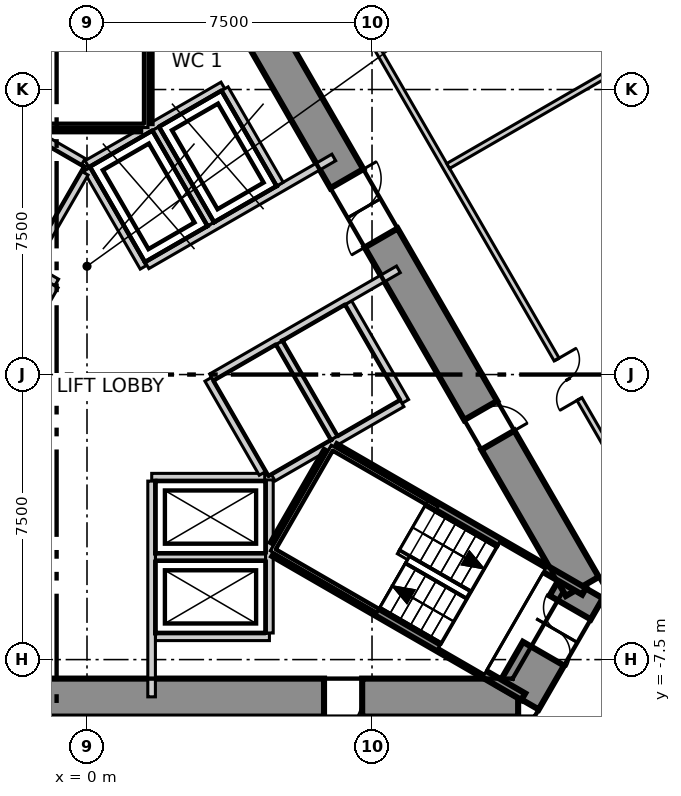
"""IFC4 building model, lengths in metres.
Left out: names, types, materials, properties, quantities, classifications, styles, units other than length and angle.
Written with IfcOpenShell. Run it as: python <this file> out.ifc"""

import sys

from ifc_helpers import new_model, si_unit, direction, frame, frame_2d, origin, place, context, subcontext, project, spatial, polyline, rectangle, outline, extrude, element, fill, save


model = new_model("IFC4")
c1 = context("Model", 3, precision=1e-05, world=origin(), true_north=direction((0.0, 1.0)))
c2 = subcontext(c1, "Body", "Model", "MODEL_VIEW")
j1 = project(units=[si_unit("LENGTHUNIT", "METRE"), si_unit("PLANEANGLEUNIT", "RADIAN")], contexts=[c1])
p1 = place(None, origin())
s1 = spatial("IfcSite", under=j1, at=p1, CompositionType="ELEMENT")
p2 = place(p1, origin())
s2 = spatial("IfcBuilding", under=s1, at=p2, CompositionType="ELEMENT")
p3 = place(p2, frame((0.0, 0.0, 180.8)))
s3 = spatial("IfcBuildingStorey", under=s2, at=p3, CompositionType="ELEMENT", Elevation=180.8)
p4 = place(p3, frame((-11.345, -8.5, -0.6), z_axis=(0.0, 0.0, 1.0), x_axis=(1.0, 0.0, 0.0)))
e1 = element("IfcWall", 1, at=p4, inside=s3, PredefinedType="SHEAR", context=c2, shape_type="SweptSolid", body=[
    extrude(outline(polyline([(-0.433, -0.5), (1.53, -0.5), (3.493, -0.5), (5.456, -0.5), (7.419, -0.5), (9.382, -0.5), (11.345, -0.5), (13.308, -0.5), (15.271, -0.5), (17.234, -0.5), (19.197, -0.5), (21.16, -0.5), (23.123, -0.5), (22.257, 0.5), (20.273, 0.5), (18.289, 0.5), (16.305, 0.5), (14.321, 0.5), (12.337, 0.5), (10.353, 0.5), (8.369, 0.5), (6.385, 0.5), (4.401, 0.5), (2.417, 0.5), (0.433, 0.5), (-0.433, -0.5)])), origin(), (0.0, 0.0, 1.0), 4.5),
])
p5 = place(p4, frame((4.444, 0.0, 0.6)))
e2 = element("IfcOpeningElement", 2, at=p5, cuts=e1, PredefinedType="OPENING", context=c2, shape_type="SweptSolid", body=[
    extrude(rectangle(XDim=0.9, YDim=2.1, at=frame_2d((0.45, 1.05))), frame((0.0, 0.51, 0.0), z_axis=(0.0, -1.0, 0.0), x_axis=(1.0, 0.0, 0.0)), (0.0, 0.0, 1.0), 1.02),
])
p6 = place(p4, frame((17.584, 0.0, 0.6)))
e3 = element("IfcOpeningElement", 3, at=p6, cuts=e1, PredefinedType="OPENING", context=c2, shape_type="SweptSolid", body=[
    extrude(rectangle(XDim=1.0, YDim=2.1, at=frame_2d((0.5, 1.05))), frame((0.0, 0.51, 0.0), z_axis=(0.0, -1.0, 0.0), x_axis=(1.0, 0.0, 0.0)), (0.0, 0.0, 1.0), 1.02),
])
p7 = place(p3, frame((11.345, -8.5, -0.6), z_axis=(0.0, 0.0, 1.0), x_axis=(0.500041548022, 0.866001414694, 0.0)))
e4 = element("IfcWall", 4, at=p7, inside=s3, PredefinedType="SHEAR", context=c2, shape_type="SweptSolid", body=[
    extrude(outline(polyline([(-0.216, -0.625), (1.689, -0.625), (3.594, -0.625), (3.161, 0.625), (1.688, 0.625), (0.216, 0.625), (-0.216, -0.625)])), origin(), (0.0, 0.0, 1.0), 4.5),
])
p8 = place(p7, frame((1.336, 0.0, 0.6)))
e5 = element("IfcOpeningElement", 5, at=p8, cuts=e4, PredefinedType="OPENING", context=c2, shape_type="SweptSolid", body=[
    extrude(rectangle(XDim=1.4, YDim=2.1, at=frame_2d((0.7, 1.05))), frame((0.0, 0.635, 0.0), z_axis=(0.0, -1.0, 0.0), x_axis=(1.0, 0.0, 0.0)), (0.0, 0.0, 1.0), 1.27),
])
p9 = place(p3, frame((13.034, -5.575, -0.6), z_axis=(0.0, 0.0, 1.0), x_axis=(-0.500003116884, 0.866023604243, 0.0)))
e6 = element("IfcWall", 6, at=p9, inside=s3, PredefinedType="SHEAR", context=c2, shape_type="SweptSolid", body=[
    extrude(outline(polyline([(-0.433, -0.5), (1.53, -0.5), (3.493, -0.5), (5.456, -0.5), (7.419, -0.5), (9.382, -0.5), (11.345, -0.5), (13.308, -0.5), (15.271, -0.5), (17.234, -0.5), (19.197, -0.5), (21.16, -0.5), (23.123, -0.5), (22.257, 0.5), (20.273, 0.5), (18.289, 0.5), (16.305, 0.5), (14.321, 0.5), (12.337, 0.5), (10.353, 0.5), (8.369, 0.5), (6.385, 0.5), (4.401, 0.5), (2.417, 0.5), (0.433, 0.5), (-0.433, -0.5)])), origin(), (0.0, 0.0, 1.0), 4.5),
])
p10 = place(p9, frame((10.589, 0.0, 0.6)))
e7 = element("IfcOpeningElement", 7, at=p10, cuts=e6, PredefinedType="OPENING", context=c2, shape_type="SweptSolid", body=[
    extrude(rectangle(XDim=1.8, YDim=2.1, at=frame_2d((0.9, 1.05))), frame((0.0, 0.51, 0.0), z_axis=(0.0, -1.0, 0.0), x_axis=(1.0, 0.0, 0.0)), (0.0, 0.0, 1.0), 1.02),
])
p11 = place(p9, frame((17.634, 0.0, 0.6)))
e8 = element("IfcOpeningElement", 8, at=p11, cuts=e6, PredefinedType="OPENING", context=c2, shape_type="SweptSolid", body=[
    extrude(rectangle(XDim=0.9, YDim=2.1, at=frame_2d((0.45, 1.05))), frame((0.0, 0.51, 0.0), z_axis=(0.0, -1.0, 0.0), x_axis=(1.0, 0.0, 0.0)), (0.0, 0.0, 1.0), 1.02),
])
p12 = place(p9, frame((4.445, 0.0, 0.6)))
e9 = element("IfcOpeningElement", 9, at=p12, cuts=e6, PredefinedType="OPENING", context=c2, shape_type="SweptSolid", body=[
    extrude(rectangle(XDim=0.9, YDim=2.1, at=frame_2d((0.45, 1.05))), frame((0.0, 0.51, 0.0), z_axis=(0.0, -1.0, 0.0), x_axis=(1.0, 0.0, 0.0)), (0.0, 0.0, 1.0), 1.02),
])
p13 = place(p3, frame((29.569, -13.712, 0.0), z_axis=(0.0, 0.0, 1.0), x_axis=(-0.500011769953, 0.866018608292, 0.0)))
e10 = element("IfcWall", 10, at=p13, inside=s3, PredefinedType="ELEMENTEDWALL", context=c2, shape_type="SweptSolid", body=[
    extrude(rectangle(XDim=53.299, YDim=0.2, at=frame_2d((26.649, 0.0))), origin(), (0.0, 0.0, 1.0), 3.9),
])
p14 = place(p13, frame((2.022, 0.0, 0.6)))
e11 = element("IfcOpeningElement", 11, at=p14, cuts=e10, PredefinedType="OPENING", context=c2, shape_type="SweptSolid", body=[
    extrude(rectangle(XDim=4.9, YDim=3.0, at=frame_2d((2.45, 1.5))), frame((0.0, 0.11, 0.0), z_axis=(0.0, -1.0, 0.0), x_axis=(1.0, 0.0, 0.0)), (0.0, 0.0, 1.0), 0.22),
])
p15 = place(p13, frame((8.361, 0.0, 0.6)))
e12 = element("IfcOpeningElement", 12, at=p15, cuts=e10, PredefinedType="OPENING", context=c2, shape_type="SweptSolid", body=[
    extrude(rectangle(XDim=4.9, YDim=3.0, at=frame_2d((2.45, 1.5))), frame((0.0, 0.11, 0.0), z_axis=(0.0, -1.0, 0.0), x_axis=(1.0, 0.0, 0.0)), (0.0, 0.0, 1.0), 0.22),
])
p16 = place(p13, frame((14.701, 0.0, 0.6)))
e13 = element("IfcOpeningElement", 13, at=p16, cuts=e10, PredefinedType="OPENING", context=c2, shape_type="SweptSolid", body=[
    extrude(rectangle(XDim=4.9, YDim=3.0, at=frame_2d((2.45, 1.5))), frame((0.0, 0.11, 0.0), z_axis=(0.0, -1.0, 0.0), x_axis=(1.0, 0.0, 0.0)), (0.0, 0.0, 1.0), 0.22),
])
p17 = place(p13, frame((21.04, 0.0, 0.6)))
e14 = element("IfcOpeningElement", 14, at=p17, cuts=e10, PredefinedType="OPENING", context=c2, shape_type="SweptSolid", body=[
    extrude(rectangle(XDim=4.9, YDim=3.0, at=frame_2d((2.45, 1.5))), frame((0.0, 0.11, 0.0), z_axis=(0.0, -1.0, 0.0), x_axis=(1.0, 0.0, 0.0)), (0.0, 0.0, 1.0), 0.22),
])
p18 = place(p13, frame((27.379, 0.0, 0.6)))
e15 = element("IfcOpeningElement", 15, at=p18, cuts=e10, PredefinedType="OPENING", context=c2, shape_type="SweptSolid", body=[
    extrude(rectangle(XDim=4.9, YDim=3.0, at=frame_2d((2.45, 1.5))), frame((0.0, 0.11, 0.0), z_axis=(0.0, -1.0, 0.0), x_axis=(1.0, 0.0, 0.0)), (0.0, 0.0, 1.0), 0.22),
])
p19 = place(p13, frame((33.718, 0.0, 0.6)))
e16 = element("IfcOpeningElement", 16, at=p19, cuts=e10, PredefinedType="OPENING", context=c2, shape_type="SweptSolid", body=[
    extrude(rectangle(XDim=4.9, YDim=3.0, at=frame_2d((2.45, 1.5))), frame((0.0, 0.11, 0.0), z_axis=(0.0, -1.0, 0.0), x_axis=(1.0, 0.0, 0.0)), (0.0, 0.0, 1.0), 0.22),
])
p20 = place(p13, frame((40.057, 0.0, 0.6)))
e17 = element("IfcOpeningElement", 17, at=p20, cuts=e10, PredefinedType="OPENING", context=c2, shape_type="SweptSolid", body=[
    extrude(rectangle(XDim=4.9, YDim=3.0, at=frame_2d((2.45, 1.5))), frame((0.0, 0.11, 0.0), z_axis=(0.0, -1.0, 0.0), x_axis=(1.0, 0.0, 0.0)), (0.0, 0.0, 1.0), 0.22),
])
p21 = place(p13, frame((46.397, 0.0, 0.6)))
e18 = element("IfcOpeningElement", 18, at=p21, cuts=e10, PredefinedType="OPENING", context=c2, shape_type="SweptSolid", body=[
    extrude(rectangle(XDim=4.9, YDim=3.0, at=frame_2d((2.45, 1.5))), frame((0.0, 0.11, 0.0), z_axis=(0.0, -1.0, 0.0), x_axis=(1.0, 0.0, 0.0)), (0.0, 0.0, 1.0), 0.22),
])
p22 = place(p3, frame((3.046, 16.525, 0.0), z_axis=(0.0, 0.0, 1.0), x_axis=(0.499986250302, -0.866033342031, 0.0)))
e19 = element("IfcWall", 19, at=p22, inside=s3, PredefinedType="PARTITIONING", context=c2, shape_type="SweptSolid", body=[
    extrude(rectangle(XDim=25.663, YDim=0.15, at=frame_2d((12.832, 0.0))), origin(), (0.0, 0.0, 1.0), 3.9),
])
p23 = place(p22, frame((18.625, 0.0, 0.0)))
e20 = element("IfcOpeningElement", 20, at=p23, cuts=e19, PredefinedType="OPENING", context=c2, shape_type="SweptSolid", body=[
    extrude(rectangle(XDim=1.2, YDim=2.1, at=frame_2d((0.6, 1.05))), frame((0.0, 0.085, 0.0), z_axis=(0.0, -1.0, 0.0), x_axis=(1.0, 0.0, 0.0)), (0.0, 0.0, 1.0), 0.17),
])
p24 = place(p22, frame((5.75, 0.0, 0.0)))
e21 = element("IfcOpeningElement", 21, at=p24, cuts=e19, PredefinedType="OPENING", context=c2, shape_type="SweptSolid", body=[
    extrude(rectangle(XDim=1.2, YDim=2.1, at=frame_2d((0.6, 1.05))), frame((0.0, 0.085, 0.0), z_axis=(0.0, -1.0, 0.0), x_axis=(1.0, 0.0, 0.0)), (0.0, 0.0, 1.0), 0.17),
])
p25 = place(p3, frame((9.504, 5.488, 0.0), z_axis=(0.0, 0.0, 1.0), x_axis=(0.8660261172, 0.499998764326, 0.0)))
e22 = element("IfcWall", 22, at=p25, inside=s3, PredefinedType="PARTITIONING", context=c2, shape_type="SweptSolid", body=[
    extrude(rectangle(XDim=7.776, YDim=0.15, at=frame_2d((3.888, 0.0))), origin(), (0.0, 0.0, 1.0), 3.4),
])
p26 = place(p3, frame((1.8, -6.9, 0.0), z_axis=(0.0, 0.0, 1.0), x_axis=(1.0, 0.0, 0.0)))
e23 = element("IfcWall", 23, at=p26, inside=s3, PredefinedType="SOLIDWALL", context=c2, shape_type="SweptSolid", body=[
    extrude(rectangle(XDim=3.0, YDim=0.2, at=frame_2d((1.5, 0.0))), origin(), (0.0, 0.0, 1.0), 3.9),
])
p27 = place(p3, frame((1.8, -4.8, 0.0), z_axis=(0.0, 0.0, 1.0), x_axis=(1.0, 0.0, 0.0)))
e24 = element("IfcWall", 24, at=p27, inside=s3, PredefinedType="SOLIDWALL", context=c2, shape_type="SweptSolid", body=[
    extrude(rectangle(XDim=2.9, YDim=0.2, at=frame_2d((1.45, 0.0))), origin(), (0.0, 0.0, 1.0), 3.9),
])
p28 = place(p3, frame((1.703, -2.7, 0.0), z_axis=(0.0, 0.0, 1.0), x_axis=(1.0, 0.0, 0.0)))
e25 = element("IfcWall", 25, at=p28, inside=s3, PredefinedType="SOLIDWALL", context=c2, shape_type="SweptSolid", body=[
    extrude(rectangle(XDim=2.973, YDim=0.2, at=frame_2d((1.487, 0.0))), origin(), (0.0, 0.0, 1.0), 3.9),
])
p29 = place(p3, frame((-0.002, 5.541, 0.0), z_axis=(0.0, 0.0, 1.0), x_axis=(0.86600155993, 0.500041296494, 0.0)))
e26 = element("IfcWall", 26, at=p29, inside=s3, PredefinedType="SOLIDWALL", context=c2, shape_type="SweptSolid", body=[
    extrude(rectangle(XDim=4.132, YDim=0.2, at=frame_2d((2.066, 0.0))), origin(), (0.0, 0.0, 1.0), 3.9),
])
p30 = place(p3, frame((0.0, 5.4, 0.0), z_axis=(0.0, 0.0, 1.0), x_axis=(0.500103862429, -0.865965430478, 0.0)))
e27 = element("IfcWall", 27, at=p30, inside=s3, PredefinedType="SOLIDWALL", context=c2, shape_type="SweptSolid", body=[
    extrude(rectangle(XDim=2.973, YDim=0.2, at=frame_2d((1.487, 0.0))), origin(), (0.0, 0.0, 1.0), 3.9),
])
p31 = place(p3, frame((3.19, -0.125, 0.0), z_axis=(0.0, 0.0, 1.0), x_axis=(0.499988658015, -0.866031951983, 0.0)))
e28 = element("IfcWall", 28, at=p31, inside=s3, PredefinedType="SOLIDWALL", context=c2, shape_type="SweptSolid", body=[
    extrude(rectangle(XDim=2.858, YDim=0.2, at=frame_2d((1.429, 0.0))), origin(), (0.0, 0.0, 1.0), 3.9),
])
p32 = place(p3, frame((1.578, 2.874, 0.0), z_axis=(0.0, 0.0, 1.0), x_axis=(0.866053804324, 0.499950805595, 0.0)))
e29 = element("IfcWall", 29, at=p32, inside=s3, PredefinedType="SOLIDWALL", context=c2, shape_type="SweptSolid", body=[
    extrude(rectangle(XDim=5.676, YDim=0.2, at=frame_2d((2.838, 0.0))), origin(), (0.0, 0.0, 1.0), 3.9),
])
p33 = place(p3, frame((1.7, -8.48, 0.0), z_axis=(0.0, 0.0, 1.0), x_axis=(0.0, 1.0, 0.0)))
e30 = element("IfcWall", 30, at=p33, inside=s3, PredefinedType="SOLIDWALL", context=c2, shape_type="SweptSolid", body=[
    extrude(rectangle(XDim=5.677, YDim=0.2, at=frame_2d((2.838, 0.0))), origin(), (0.0, 0.0, 1.0), 3.9),
])
p34 = place(p3, frame((4.8, -6.8, 0.0), z_axis=(0.0, 0.0, 1.0), x_axis=(0.0, 1.0, 0.0)))
e31 = element("IfcWall", 31, at=p34, inside=s3, PredefinedType="SOLIDWALL", context=c2, shape_type="SweptSolid", body=[
    extrude(rectangle(XDim=4.029, YDim=0.2, at=frame_2d((2.015, 0.0))), origin(), (0.0, 0.0, 1.0), 3.9),
])
p35 = place(p3, frame((3.626, 7.52, 0.0), z_axis=(0.0, 0.0, 1.0), x_axis=(0.500060147554, -0.865990674793, 0.0)))
e32 = element("IfcWall", 32, at=p35, inside=s3, PredefinedType="SOLIDWALL", context=c2, shape_type="SweptSolid", body=[
    extrude(rectangle(XDim=2.9, YDim=0.2, at=frame_2d((1.45, 0.0))), origin(), (0.0, 0.0, 1.0), 3.9),
])
p36 = place(p3, frame((6.876, 1.891, 0.0), z_axis=(0.0, 0.0, 1.0), x_axis=(0.499990139034, -0.866031096941, 0.0)))
e33 = element("IfcWall", 33, at=p36, inside=s3, PredefinedType="SOLIDWALL", context=c2, shape_type="SweptSolid", body=[
    extrude(rectangle(XDim=3.0, YDim=0.2, at=frame_2d((1.5, 0.0))), origin(), (0.0, 0.0, 1.0), 3.9),
])
for number, where, z_axis, x_axis in (
    (34, (1.807, 6.47, 0.0), (0.0, 0.0, 1.0), (0.5, -0.866, 0.0)),
    (35, (5.057, 0.841, 0.0), (0.0, 0.0, 1.0), (0.5, -0.866, 0.0)),
):
    element("IfcWall", number, at=place(p3, frame(where, z_axis=z_axis, x_axis=x_axis)), inside=s3, PredefinedType="SOLIDWALL", context=c2, shape_type="SweptSolid", body=[
        extrude(rectangle(XDim=2.9, YDim=0.2, at=frame_2d((1.45, 0.0))), origin(), (0.0, 0.0, 1.0), 3.9),
    ])
p37 = place(p3, frame((3.278, -0.071, 0.0), z_axis=(0.0, 0.0, 1.0), x_axis=(0.865960685568, 0.50011207849, 0.0)))
e36 = element("IfcWall", 36, at=p37, inside=s3, PredefinedType="SOLIDWALL", context=c2, shape_type="SweptSolid", body=[
    extrude(rectangle(XDim=5.677, YDim=0.2, at=frame_2d((2.838, 0.0))), origin(), (0.0, 0.0, 1.0), 3.9),
])
p38 = place(p3, frame((4.9, -2.714, 0.0), z_axis=(0.0, 0.0, 1.0), x_axis=(0.865992350556, 0.500057245502, 0.0)))
e37 = element("IfcWall", 37, at=p38, inside=s3, PredefinedType="SOLIDWALL", context=c2, shape_type="SweptSolid", body=[
    extrude(rectangle(XDim=3.914, YDim=0.2, at=frame_2d((1.957, 0.0))), origin(), (0.0, 0.0, 1.0), 3.9),
])
p39 = place(p3, frame((-1.488, 2.822, 0.0), z_axis=(0.0, 0.0, 1.0), x_axis=(0.866236612152, -0.499633997809, 0.0)))
e38 = element("IfcWall", 38, at=p39, inside=s3, PredefinedType="SOLIDWALL", context=c2, shape_type="SweptSolid", body=[
    extrude(rectangle(XDim=0.796, YDim=0.2, at=frame_2d((0.398, 0.0))), origin(), (0.0, 0.0, 1.0), 3.9),
])
p40 = place(p3, frame((-2.444, -0.433, 0.0), z_axis=(0.0, 0.0, 1.0), x_axis=(0.500035624827, 0.866004834804, 0.0)))
e39 = element("IfcWall", 39, at=p40, inside=s3, PredefinedType="SOLIDWALL", context=c2, shape_type="SweptSolid", body=[
    extrude(rectangle(XDim=3.194, YDim=0.2, at=frame_2d((1.597, 0.0))), origin(), (0.0, 0.0, 1.0), 3.9),
])
p41 = place(p3, frame((-1.67, 6.507, 0.0), z_axis=(0.0, 0.0, 1.0), x_axis=(0.865941441609, -0.500145398563, 0.0)))
e40 = element("IfcWall", 40, at=p41, inside=s3, PredefinedType="SOLIDWALL", context=c2, shape_type="SweptSolid", body=[
    extrude(rectangle(XDim=1.815, YDim=0.2, at=frame_2d((0.908, 0.0))), origin(), (0.0, 0.0, 1.0), 3.9),
])
p42 = place(p3, frame((-1.438, 2.909, 0.0), z_axis=(0.0, 0.0, 1.0), x_axis=(0.499829630636, 0.866123744241, 0.0)))
e41 = element("IfcWall", 41, at=p42, inside=s3, PredefinedType="SOLIDWALL", context=c2, shape_type="SweptSolid", body=[
    extrude(rectangle(XDim=2.761, YDim=0.2, at=frame_2d((1.38, 0.0))), origin(), (0.0, 0.0, 1.0), 3.9),
])
p43 = place(p3, frame((1.6, 6.615, 0.0), z_axis=(0.0, 0.0, 1.0), x_axis=(0.0, 1.0, 0.0)))
e42 = element("IfcWall", 42, at=p43, inside=s3, PredefinedType="SOLIDWALL", context=c2, shape_type="SweptSolid", body=[
    extrude(rectangle(XDim=7.565, YDim=0.2, at=frame_2d((3.782, 0.0))), origin(), (0.0, 0.0, 1.0), 3.9),
])
p44 = place(p3, frame((-1.4, 6.5, 0.0), z_axis=(0.0, 0.0, 1.0), x_axis=(1.0, 0.0, 0.0)))
e43 = element("IfcWall", 43, at=p44, inside=s3, PredefinedType="SOLIDWALL", context=c2, shape_type="SweptSolid", body=[
    extrude(rectangle(XDim=2.8, YDim=0.2, at=frame_2d((1.4, 0.0))), origin(), (0.0, 0.0, 1.0), 3.9),
])
p45 = place(p3, frame((4.929, -4.462, 0.0), z_axis=(0.0, 0.0, 1.0), x_axis=(0.500200581029, 0.865909567298, 0.0)))
e44 = element("IfcWall", 44, at=p45, inside=s3, PredefinedType="SOLIDWALL", context=c2, shape_type="SweptSolid", body=[
    extrude(rectangle(XDim=2.799, YDim=0.2, at=frame_2d((1.399, 0.0))), origin(), (0.0, 0.0, 1.0), 3.9),
])
p46 = place(p3, frame((6.529, -1.922, 0.0), z_axis=(0.0, 0.0, 1.0), x_axis=(0.866039934834, -0.499974830638, 0.0)))
e45 = element("IfcWall", 45, at=p46, inside=s3, PredefinedType="SOLIDWALL", context=c2, shape_type="SweptSolid", body=[
    extrude(rectangle(XDim=7.564, YDim=0.2, at=frame_2d((3.782, 0.0))), origin(), (0.0, 0.0, 1.0), 3.9),
])
p47 = place(p3, frame((4.929, -4.693, 0.0), z_axis=(0.0, 0.0, 1.0), x_axis=(0.865984032653, -0.500071650056, 0.0)))
e46 = element("IfcWall", 46, at=p47, inside=s3, PredefinedType="SOLIDWALL", context=c2, shape_type="SweptSolid", body=[
    extrude(rectangle(XDim=7.565, YDim=0.2, at=frame_2d((3.782, 0.0))), origin(), (0.0, 0.0, 1.0), 3.9),
])
p48 = place(p23, origin())
e47 = element("IfcDoor", 47, at=p48, inside=s3, OperationType="DOUBLE_DOOR_SINGLE_SWING", PredefinedType="DOOR", context=c2, shape_type="SweptSolid", body=[
    extrude(rectangle(XDim=1.2, YDim=2.1, at=frame_2d((0.6, 1.05))), frame((0.0, 0.025, 0.0), z_axis=(0.0, -1.0, 0.0), x_axis=(1.0, 0.0, 0.0)), (0.0, 0.0, 1.0), 0.05),
])
fill(e20, e47)
p49 = place(p10, origin())
e48 = element("IfcDoor", 48, at=p49, inside=s3, OperationType="DOUBLE_DOOR_SINGLE_SWING", PredefinedType="DOOR", context=c2, shape_type="SweptSolid", body=[
    extrude(rectangle(XDim=1.8, YDim=2.1, at=frame_2d((0.9, 1.05))), frame((0.0, 0.025, 0.0), z_axis=(0.0, -1.0, 0.0), x_axis=(1.0, 0.0, 0.0)), (0.0, 0.0, 1.0), 0.05),
])
fill(e7, e48)
p50 = place(p8, origin())
e49 = element("IfcDoor", 49, at=p50, inside=s3, OperationType="DOUBLE_DOOR_SINGLE_SWING", PredefinedType="DOOR", context=c2, shape_type="SweptSolid", body=[
    extrude(rectangle(XDim=1.4, YDim=2.1, at=frame_2d((0.7, 1.05))), frame((0.0, 0.025, 0.0), z_axis=(0.0, -1.0, 0.0), x_axis=(1.0, 0.0, 0.0)), (0.0, 0.0, 1.0), 0.05),
])
fill(e5, e49)
p51 = place(p6, origin())
e50 = element("IfcDoor", 50, at=p51, inside=s3, OperationType="SINGLE_SWING_LEFT", PredefinedType="DOOR", context=c2, shape_type="SweptSolid", body=[
    extrude(rectangle(XDim=1.0, YDim=2.1, at=frame_2d((0.5, 1.05))), frame((0.0, 0.225, 0.0), z_axis=(0.0, -1.0, 0.0), x_axis=(1.0, 0.0, 0.0)), (0.0, 0.0, 1.0), 0.05),
])
fill(e3, e50)
p52 = place(p12, origin())
e51 = element("IfcDoor", 51, at=p52, inside=s3, OperationType="SINGLE_SWING_LEFT", PredefinedType="DOOR", context=c2, shape_type="SweptSolid", body=[
    extrude(rectangle(XDim=0.9, YDim=2.1, at=frame_2d((0.45, 1.05))), frame((0.0, 0.025, 0.0), z_axis=(0.0, -1.0, 0.0), x_axis=(1.0, 0.0, 0.0)), (0.0, 0.0, 1.0), 0.05),
])
fill(e9, e51)
save(model, sys.argv[1])
